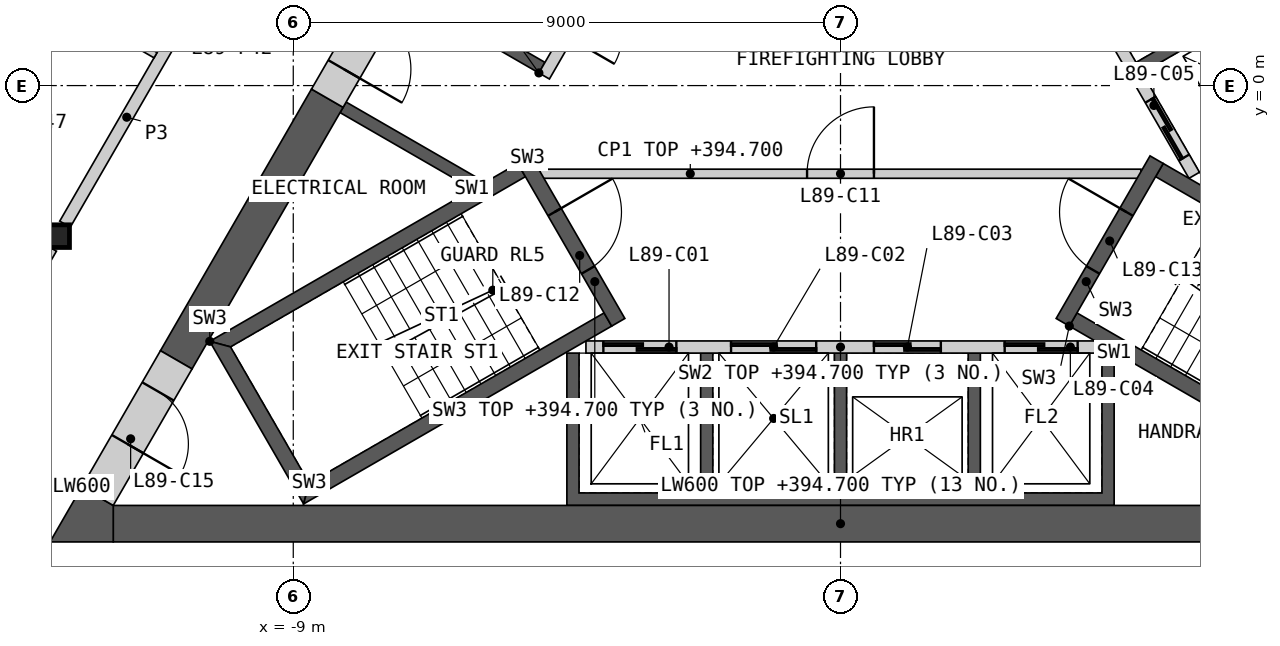
"""IFC4 building model, lengths in metres.
Left out: names, types, materials, properties, quantities, classifications, styles, units other than length and angle.
Written with IfcOpenShell. Run it as: python <this file> out.ifc"""

import sys

from ifc_helpers import new_model, si_unit, direction, frame, frame_2d, origin, origin_2d, place, context, subcontext, project, spatial, polyline, rectangle, i_section, outline, extrude, element, fill, save


model = new_model("IFC4")
c1 = context("Model", 3, precision=1e-05, world=origin(), true_north=direction((0.0, 1.0)))
c2 = subcontext(c1, "Body", "Model", "MODEL_VIEW")
j1 = project(units=[si_unit("LENGTHUNIT", "METRE"), si_unit("PLANEANGLEUNIT", "RADIAN")], contexts=[c1])
p1 = place(None, origin())
s1 = spatial("IfcSite", under=j1, at=p1, CompositionType="ELEMENT")
p2 = place(p1, origin())
s2 = spatial("IfcBuilding", under=s1, at=p2, CompositionType="ELEMENT")
p3 = place(p2, frame((0.0, 0.0, 391.6)))
s3 = spatial("IfcBuildingStorey", under=s2, at=p3, CompositionType="ELEMENT", Elevation=391.6)
p4 = place(p3, frame((-12.868, -2.476, 0.0), z_axis=(0.0, 0.0, 1.0), x_axis=(1.0, 0.0, 0.0)))
e1 = element("IfcColumn", 1, at=p4, inside=s3, PredefinedType="COLUMN", context=c2, shape_type="SweptSolid", body=[
    extrude(i_section(OverallWidth=0.374, OverallDepth=0.372, WebThickness=0.016, FlangeThickness=0.026, at=origin_2d()), origin(), (0.0, 0.0, 1.0), 3.4),
])
p5 = place(p3, origin())
e2 = element("IfcWall", 2, at=p5, inside=s3, PredefinedType="SHEAR", context=c2, shape_type="SweptSolid", body=[
    extrude(outline(polyline([(4.5, -4.4), (4.5, -6.906), (-4.5, -6.906), (-4.5, -4.4), (-4.3, -4.4), (-4.3, -6.7), (-2.3, -6.7), (-2.3, -4.4), (-2.1, -4.4), (-2.1, -6.7), (-0.1, -6.7), (-0.1, -4.4), (0.1, -4.4), (0.1, -6.7), (2.1, -6.7), (2.1, -4.4), (2.3, -4.4), (2.3, -6.7), (4.3, -6.7), (4.3, -4.4), (4.5, -4.4)])), origin(), (0.0, 0.0, 1.0), 3.1),
])
p6 = place(p3, frame((-4.187, -4.3, 0.0), z_axis=(0.0, 0.0, 1.0), x_axis=(1.0, 0.0, 0.0)))
e3 = element("IfcWall", 3, at=p6, inside=s3, PredefinedType="SOLIDWALL", context=c2, shape_type="SweptSolid", body=[
    extrude(rectangle(XDim=8.373, YDim=0.2, at=frame_2d((4.187, 0.0))), origin(), (0.0, 0.0, 1.0), 3.1),
])
p7 = place(p6, frame((0.287, 0.0, 0.0)))
e4 = element("IfcOpeningElement", 4, at=p7, cuts=e3, PredefinedType="OPENING", context=c2, shape_type="SweptSolid", body=[
    extrude(rectangle(XDim=1.2, YDim=2.1, at=frame_2d((0.6, 1.05))), frame((0.0, 0.11, 0.0), z_axis=(0.0, -1.0, 0.0), x_axis=(1.0, 0.0, 0.0)), (0.0, 0.0, 1.0), 0.22),
])
p8 = place(p6, frame((2.387, 0.0, 0.0)))
e5 = element("IfcOpeningElement", 5, at=p8, cuts=e3, PredefinedType="OPENING", context=c2, shape_type="SweptSolid", body=[
    extrude(rectangle(XDim=1.4, YDim=2.1, at=frame_2d((0.7, 1.05))), frame((0.0, 0.11, 0.0), z_axis=(0.0, -1.0, 0.0), x_axis=(1.0, 0.0, 0.0)), (0.0, 0.0, 1.0), 0.22),
])
p9 = place(p6, frame((4.737, 0.0, 0.0)))
e6 = element("IfcOpeningElement", 6, at=p9, cuts=e3, PredefinedType="OPENING", context=c2, shape_type="SweptSolid", body=[
    extrude(rectangle(XDim=1.1, YDim=2.1, at=frame_2d((0.55, 1.05))), frame((0.0, 0.11, 0.0), z_axis=(0.0, -1.0, 0.0), x_axis=(1.0, 0.0, 0.0)), (0.0, 0.0, 1.0), 0.22),
])
p10 = place(p6, frame((6.887, 0.0, 0.0)))
e7 = element("IfcOpeningElement", 7, at=p10, cuts=e3, PredefinedType="OPENING", context=c2, shape_type="SweptSolid", body=[
    extrude(rectangle(XDim=1.2, YDim=2.1, at=frame_2d((0.6, 1.05))), frame((0.0, 0.11, 0.0), z_axis=(0.0, -1.0, 0.0), x_axis=(1.0, 0.0, 0.0)), (0.0, 0.0, 1.0), 0.22),
])
p11 = place(p3, origin())
e8 = element("IfcWall", 8, at=p11, inside=s3, PredefinedType="SHEAR", context=c2, shape_type="SweptSolid", body=[
    extrude(outline(polyline([(1.561, 6.097), (3.731, 7.35), (8.231, -0.444), (6.061, -1.697), (5.96, -1.524), (7.952, -0.374), (6.952, 1.358), (4.96, 0.208), (4.861, 0.381), (6.852, 1.531), (5.852, 3.263), (3.861, 2.113), (3.76, 2.287), (5.752, 3.437), (4.752, 5.169), (2.76, 4.019), (2.66, 4.192), (4.652, 5.342), (3.652, 7.074), (1.66, 5.924), (1.561, 6.097)])), origin(), (0.0, 0.0, 1.0), 3.1),
])
p12 = place(p3, frame((5.817, -1.476, 0.0), z_axis=(0.0, 0.0, 1.0), x_axis=(-0.500002616675, 0.866023893041, 0.0)))
e9 = element("IfcWall", 9, at=p12, inside=s3, PredefinedType="SOLIDWALL", context=c2, shape_type="SweptSolid", body=[
    extrude(rectangle(XDim=8.373, YDim=0.2, at=frame_2d((4.187, 0.0))), origin(), (0.0, 0.0, 1.0), 3.1),
])
p13 = place(p12, frame((0.337, 0.0, 0.0)))
e10 = element("IfcOpeningElement", 10, at=p13, cuts=e9, PredefinedType="OPENING", context=c2, shape_type="SweptSolid", body=[
    extrude(rectangle(XDim=1.1, YDim=2.1, at=frame_2d((0.55, 1.05))), frame((0.0, 0.11, 0.0), z_axis=(0.0, -1.0, 0.0), x_axis=(1.0, 0.0, 0.0)), (0.0, 0.0, 1.0), 0.22),
])
p14 = place(p12, frame((2.537, 0.0, 0.0)))
e11 = element("IfcOpeningElement", 11, at=p14, cuts=e9, PredefinedType="OPENING", context=c2, shape_type="SweptSolid", body=[
    extrude(rectangle(XDim=1.1, YDim=2.1, at=frame_2d((0.55, 1.05))), frame((0.0, 0.11, 0.0), z_axis=(0.0, -1.0, 0.0), x_axis=(1.0, 0.0, 0.0)), (0.0, 0.0, 1.0), 0.22),
])
p15 = place(p12, frame((4.737, 0.0, 0.0)))
e12 = element("IfcOpeningElement", 12, at=p15, cuts=e9, PredefinedType="OPENING", context=c2, shape_type="SweptSolid", body=[
    extrude(rectangle(XDim=1.1, YDim=2.1, at=frame_2d((0.55, 1.05))), frame((0.0, 0.11, 0.0), z_axis=(0.0, -1.0, 0.0), x_axis=(1.0, 0.0, 0.0)), (0.0, 0.0, 1.0), 0.22),
])
p16 = place(p12, frame((7.037, 0.0, 0.0)))
e13 = element("IfcOpeningElement", 13, at=p16, cuts=e9, PredefinedType="OPENING", context=c2, shape_type="SweptSolid", body=[
    extrude(rectangle(XDim=0.9, YDim=2.1, at=frame_2d((0.45, 1.05))), frame((0.0, 0.11, 0.0), z_axis=(0.0, -1.0, 0.0), x_axis=(1.0, 0.0, 0.0)), (0.0, 0.0, 1.0), 0.22),
])
p17 = place(p3, origin())
e14 = element("IfcWall", 14, at=p17, inside=s3, PredefinedType="SHEAR", context=c2, shape_type="SweptSolid", body=[
    extrude(outline(polyline([(-6.061, -1.697), (-8.231, -0.444), (-8.131, -0.271), (-5.96, -1.524), (-6.061, -1.697)])), origin(), (0.0, 0.0, 1.0), 3.1),
])
p18 = place(p3, origin())
e15 = element("IfcWall", 15, at=p18, inside=s3, PredefinedType="SHEAR", context=c2, shape_type="SweptSolid", body=[
    extrude(outline(polyline([(-4.96, 0.208), (-7.131, 1.461), (-3.731, 7.35), (-1.561, 6.097), (-1.66, 5.924), (-3.652, 7.074), (-5.752, 3.437), (-3.76, 2.287), (-3.861, 2.113), (-5.852, 3.263), (-6.852, 1.531), (-4.861, 0.381), (-4.96, 0.208)])), origin(), (0.0, 0.0, 1.0), 3.1),
])
p19 = place(p3, frame((-1.631, 5.776, 0.0), z_axis=(0.0, 0.0, 1.0), x_axis=(-0.499992876559, -0.866029516466, 0.0)))
e16 = element("IfcWall", 16, at=p19, inside=s3, PredefinedType="SOLIDWALL", context=c2, shape_type="SweptSolid", body=[
    extrude(rectangle(XDim=6.486, YDim=0.2, at=frame_2d((3.243, 0.0))), origin(), (0.0, 0.0, 1.0), 3.1),
])
p20 = place(p19, frame((1.537, 0.0, 0.0)))
e17 = element("IfcOpeningElement", 17, at=p20, cuts=e16, PredefinedType="OPENING", context=c2, shape_type="SweptSolid", body=[
    extrude(rectangle(XDim=0.9, YDim=2.1, at=frame_2d((0.45, 1.05))), frame((0.0, 0.11, 0.0), z_axis=(0.0, -1.0, 0.0), x_axis=(1.0, 0.0, 0.0)), (0.0, 0.0, 1.0), 0.22),
])
p21 = place(p19, frame((4.837, 0.0, 0.0)))
e18 = element("IfcOpeningElement", 18, at=p21, cuts=e16, PredefinedType="OPENING", context=c2, shape_type="SweptSolid", body=[
    extrude(rectangle(XDim=0.9, YDim=2.1, at=frame_2d((0.45, 1.05))), frame((0.0, 0.11, 0.0), z_axis=(0.0, -1.0, 0.0), x_axis=(1.0, 0.0, 0.0)), (0.0, 0.0, 1.0), 0.22),
])
p22 = place(p3, frame((-4.941, -1.45, 0.0), z_axis=(0.0, 0.0, 1.0), x_axis=(1.0, 0.0, 0.0)))
e19 = element("IfcWall", 19, at=p22, inside=s3, PredefinedType="PARTITIONING", context=c2, shape_type="SweptSolid", body=[
    extrude(rectangle(XDim=9.882, YDim=0.15, at=frame_2d((4.941, 0.0))), origin(), (0.0, 0.0, 1.0), 3.1),
])
p23 = place(p22, frame((4.391, 0.0, 0.0)))
e20 = element("IfcOpeningElement", 20, at=p23, cuts=e19, PredefinedType="OPENING", context=c2, shape_type="SweptSolid", body=[
    extrude(rectangle(XDim=1.1, YDim=2.1, at=frame_2d((0.55, 1.05))), frame((0.0, 0.085, 0.0), z_axis=(0.0, -1.0, 0.0), x_axis=(1.0, 0.0, 0.0)), (0.0, 0.0, 1.0), 0.17),
])
p24 = place(p3, origin())
e21 = element("IfcWall", 21, at=p24, inside=s3, PredefinedType="SHEAR", context=c2, shape_type="SweptSolid", body=[
    extrude(outline(polyline([(-5.307, -1.281), (-10.374, -4.206), (-10.032, -4.298), (-5.182, -1.498), (-5.307, -1.281)])), origin(), (0.0, 0.0, 1.0), 3.1),
])
p25 = place(p3, origin())
e22 = element("IfcWall", 22, at=p25, inside=s3, PredefinedType="SHEAR", context=c2, shape_type="SweptSolid", body=[
    extrude(outline(polyline([(-10.374, -4.206), (-8.83, -6.881), (-8.738, -6.539), (-10.032, -4.298), (-10.374, -4.206)])), origin(), (0.0, 0.0, 1.0), 3.1),
])
p26 = place(p3, origin())
e23 = element("IfcWall", 23, at=p26, inside=s3, PredefinedType="SHEAR", context=c2, shape_type="SweptSolid", body=[
    extrude(outline(polyline([(-8.738, -6.539), (-8.83, -6.881), (-3.763, -3.956), (-3.888, -3.739), (-8.738, -6.539)])), origin(), (0.0, 0.0, 1.0), 3.1),
])
p27 = place(p3, frame((-5.199, -1.219, 0.0), z_axis=(0.0, 0.0, 1.0), x_axis=(0.499982516597, -0.866035497597, 0.0)))
e24 = element("IfcWall", 24, at=p27, inside=s3, PredefinedType="SHEAR", context=c2, shape_type="SweptSolid", body=[
    extrude(rectangle(XDim=3.088, YDim=0.25, at=frame_2d((1.544, 0.0))), origin(), (0.0, 0.0, 1.0), 3.1),
])
p28 = place(p27, frame((0.994, 0.0, 0.0)))
e25 = element("IfcOpeningElement", 25, at=p28, cuts=e24, PredefinedType="OPENING", context=c2, shape_type="SweptSolid", body=[
    extrude(rectangle(XDim=1.1, YDim=2.1, at=frame_2d((0.55, 1.05))), frame((0.0, 0.135, 0.0), z_axis=(0.0, -1.0, 0.0), x_axis=(1.0, 0.0, 0.0)), (0.0, 0.0, 1.0), 0.27),
])
p29 = place(p3, origin())
e26 = element("IfcWall", 26, at=p29, inside=s3, PredefinedType="SHEAR", context=c2, shape_type="SweptSolid", body=[
    extrude(outline(polyline([(3.763, -3.956), (8.83, -6.881), (8.738, -6.539), (3.888, -3.739), (3.763, -3.956)])), origin(), (0.0, 0.0, 1.0), 3.1),
])
p30 = place(p3, origin())
e27 = element("IfcWall", 27, at=p30, inside=s3, PredefinedType="SHEAR", context=c2, shape_type="SweptSolid", body=[
    extrude(outline(polyline([(10.032, -4.298), (10.374, -4.206), (5.307, -1.281), (5.182, -1.498), (10.032, -4.298)])), origin(), (0.0, 0.0, 1.0), 3.1),
])
p31 = place(p3, frame((3.655, -3.893, 0.0), z_axis=(0.0, 0.0, 1.0), x_axis=(0.499982516597, 0.866035497597, 0.0)))
e28 = element("IfcWall", 28, at=p31, inside=s3, PredefinedType="SHEAR", context=c2, shape_type="SweptSolid", body=[
    extrude(rectangle(XDim=3.088, YDim=0.25, at=frame_2d((1.544, 0.0))), origin(), (0.0, 0.0, 1.0), 3.1),
])
p32 = place(p31, frame((0.994, 0.0, 0.0)))
e29 = element("IfcOpeningElement", 29, at=p32, cuts=e28, PredefinedType="OPENING", context=c2, shape_type="SweptSolid", body=[
    extrude(rectangle(XDim=1.1, YDim=2.1, at=frame_2d((0.55, 1.05))), frame((0.0, 0.135, 0.0), z_axis=(0.0, -1.0, 0.0), x_axis=(1.0, 0.0, 0.0)), (0.0, 0.0, 1.0), 0.27),
])
p33 = place(p3, frame((-11.961, -7.206, 0.0), z_axis=(0.0, 0.0, 1.0), x_axis=(1.0, 0.0, 0.0)))
e30 = element("IfcWall", 30, at=p33, inside=s3, PredefinedType="SHEAR", context=c2, shape_type="SweptSolid", body=[
    extrude(rectangle(XDim=23.921, YDim=0.6, at=frame_2d((11.961, 0.0))), origin(), (0.0, 0.0, 1.0), 3.1),
])
p34 = place(p3, frame((8.686, -0.634, 0.0), z_axis=(0.0, 0.0, 1.0), x_axis=(-0.50001836461, 0.866014800712, 0.0)))
e31 = element("IfcWall", 31, at=p34, inside=s3, PredefinedType="SHEAR", context=c2, shape_type="SweptSolid", body=[
    extrude(rectangle(XDim=10.451, YDim=0.6, at=frame_2d((5.225, 0.0))), origin(), (0.0, 0.0, 1.0), 3.1),
])
p35 = place(p3, frame((-8.44, -0.208, 0.0), z_axis=(0.0, 0.0, 1.0), x_axis=(-0.500007425856, -0.866021116422, 0.0)))
e32 = element("IfcWall", 32, at=p35, inside=s3, PredefinedType="SHEAR", context=c2, shape_type="SweptSolid", body=[
    extrude(rectangle(XDim=4.969, YDim=0.6, at=frame_2d((2.484, 0.0))), origin(), (0.0, 0.0, 1.0), 3.1),
])
p36 = place(p3, origin())
e33 = element("IfcWall", 33, at=p36, inside=s3, PredefinedType="SHEAR", context=c2, shape_type="SweptSolid", body=[
    extrude(outline(polyline([(-12.48, -6.606), (-11.961, -6.906), (-11.961, -7.506), (-13.0, -7.506), (-12.48, -6.606)])), origin(), (0.0, 0.0, 1.0), 3.1),
])
p37 = place(p3, frame((-10.925, -4.511, 0.0), z_axis=(0.0, 0.0, 1.0), x_axis=(-0.500018667571, -0.866014625789, 0.0)))
e34 = element("IfcWall", 34, at=p37, inside=s3, PredefinedType="SHEAR", context=c2, shape_type="SweptSolid", body=[
    extrude(rectangle(XDim=2.592, YDim=0.6, at=frame_2d((1.296, 0.0))), origin(), (0.0, 0.0, 1.0), 3.1),
])
p38 = place(p37, frame((0.6, 0.0, 0.0)))
e35 = element("IfcOpeningElement", 35, at=p38, cuts=e34, PredefinedType="OPENING", context=c2, shape_type="SweptSolid", body=[
    extrude(rectangle(XDim=1.0, YDim=2.1, at=frame_2d((0.5, 1.05))), frame((0.0, 0.31, 0.0), z_axis=(0.0, -1.0, 0.0), x_axis=(1.0, 0.0, 0.0)), (0.0, 0.0, 1.0), 0.62),
])
p39 = place(p3, frame((-7.34, 1.698, 0.0), z_axis=(0.0, 0.0, 1.0), x_axis=(-0.50002983664, -0.866008176907, 0.0)))
e36 = element("IfcWall", 36, at=p39, inside=s3, PredefinedType="SHEAR", context=c2, shape_type="SweptSolid", body=[
    extrude(rectangle(XDim=2.2, YDim=0.6, at=frame_2d((1.1, 0.0))), origin(), (0.0, 0.0, 1.0), 3.1),
])
p40 = place(p39, frame((0.55, 0.0, 0.0)))
e37 = element("IfcOpeningElement", 37, at=p40, cuts=e36, PredefinedType="OPENING", context=c2, shape_type="SweptSolid", body=[
    extrude(rectangle(XDim=1.1, YDim=2.1, at=frame_2d((0.55, 1.05))), frame((0.0, 0.31, 0.0), z_axis=(0.0, -1.0, 0.0), x_axis=(1.0, 0.0, 0.0)), (0.0, 0.0, 1.0), 0.62),
])
p41 = place(p3, frame((-12.754, -2.279, 0.0), z_axis=(0.0, 0.0, 1.0), x_axis=(0.500001682468, 0.866024432409, 0.0)))
e38 = element("IfcWall", 38, at=p41, inside=s3, PredefinedType="PARTITIONING", context=c2, shape_type="SweptSolid", body=[
    extrude(rectangle(XDim=8.124, YDim=0.2, at=frame_2d((4.062, 0.0))), origin(), (0.0, 0.0, 1.0), 3.1),
])
p42 = place(p41, frame((3.762, 0.0, 0.0)))
e39 = element("IfcOpeningElement", 39, at=p42, cuts=e38, PredefinedType="OPENING", context=c2, shape_type="SweptSolid", body=[
    extrude(rectangle(XDim=1.0, YDim=2.1, at=frame_2d((0.5, 1.05))), frame((0.0, 0.11, 0.0), z_axis=(0.0, -1.0, 0.0), x_axis=(1.0, 0.0, 0.0)), (0.0, 0.0, 1.0), 0.22),
])
p43 = place(p3, frame((-15.244, -6.592, 0.0), z_axis=(0.0, 0.0, 1.0), x_axis=(0.499974648164, 0.866040040179, 0.0)))
e40 = element("IfcWall", 40, at=p43, inside=s3, PredefinedType="PARTITIONING", context=c2, shape_type="SweptSolid", body=[
    extrude(rectangle(XDim=4.525, YDim=0.2, at=frame_2d((2.263, 0.0))), origin(), (0.0, 0.0, 1.0), 3.1),
])
p44 = place(p3, frame((-17.414, 4.049, 0.0), z_axis=(0.0, 0.0, 1.0), x_axis=(0.866033839264, -0.499985389037, 0.0)))
e41 = element("IfcWall", 41, at=p44, inside=s3, PredefinedType="PARTITIONING", context=c2, shape_type="SweptSolid", body=[
    extrude(rectangle(XDim=7.1, YDim=0.1, at=frame_2d((3.55, 0.0))), origin(), (0.0, 0.0, 1.0), 2.33),
])
p45 = place(p44, frame((1.158, 0.0, 0.0)))
e42 = element("IfcOpeningElement", 42, at=p45, cuts=e41, PredefinedType="OPENING", context=c2, shape_type="SweptSolid", body=[
    extrude(rectangle(XDim=0.95, YDim=2.1, at=frame_2d((0.475, 1.05))), frame((0.0, 0.06, 0.0), z_axis=(0.0, -1.0, 0.0), x_axis=(1.0, 0.0, 0.0)), (0.0, 0.0, 1.0), 0.12),
])
p46 = place(p7, origin())
e43 = element("IfcDoor", 43, at=p46, inside=s3, OperationType="SLIDING_TO_LEFT", PredefinedType="DOOR", context=c2, shape_type="SweptSolid", body=[
    extrude(rectangle(XDim=1.2, YDim=2.1, at=frame_2d((0.6, 1.05))), frame((0.0, 0.025, 0.0), z_axis=(0.0, -1.0, 0.0), x_axis=(1.0, 0.0, 0.0)), (0.0, 0.0, 1.0), 0.05),
])
fill(e4, e43)
p47 = place(p8, origin())
e44 = element("IfcDoor", 44, at=p47, inside=s3, OperationType="SLIDING_TO_LEFT", PredefinedType="DOOR", context=c2, shape_type="SweptSolid", body=[
    extrude(rectangle(XDim=1.4, YDim=2.1, at=frame_2d((0.7, 1.05))), frame((0.0, 0.025, 0.0), z_axis=(0.0, -1.0, 0.0), x_axis=(1.0, 0.0, 0.0)), (0.0, 0.0, 1.0), 0.05),
])
fill(e5, e44)
p48 = place(p9, origin())
e45 = element("IfcDoor", 45, at=p48, inside=s3, OperationType="SLIDING_TO_LEFT", PredefinedType="DOOR", context=c2, shape_type="SweptSolid", body=[
    extrude(rectangle(XDim=1.1, YDim=2.1, at=frame_2d((0.55, 1.05))), frame((0.0, 0.025, 0.0), z_axis=(0.0, -1.0, 0.0), x_axis=(1.0, 0.0, 0.0)), (0.0, 0.0, 1.0), 0.05),
])
fill(e6, e45)
p49 = place(p10, origin())
e46 = element("IfcDoor", 46, at=p49, inside=s3, OperationType="SLIDING_TO_LEFT", PredefinedType="DOOR", context=c2, shape_type="SweptSolid", body=[
    extrude(rectangle(XDim=1.2, YDim=2.1, at=frame_2d((0.6, 1.05))), frame((0.0, 0.025, 0.0), z_axis=(0.0, -1.0, 0.0), x_axis=(1.0, 0.0, 0.0)), (0.0, 0.0, 1.0), 0.05),
])
fill(e7, e46)
p50 = place(p13, origin())
e47 = element("IfcDoor", 47, at=p50, inside=s3, OperationType="SLIDING_TO_LEFT", PredefinedType="DOOR", context=c2, shape_type="SweptSolid", body=[
    extrude(rectangle(XDim=1.1, YDim=2.1, at=frame_2d((0.55, 1.05))), frame((0.0, 0.025, 0.0), z_axis=(0.0, -1.0, 0.0), x_axis=(1.0, 0.0, 0.0)), (0.0, 0.0, 1.0), 0.05),
])
fill(e10, e47)
p51 = place(p23, origin())
e48 = element("IfcDoor", 48, at=p51, inside=s3, OperationType="SINGLE_SWING_RIGHT", PredefinedType="DOOR", context=c2, shape_type="SweptSolid", body=[
    extrude(rectangle(XDim=1.1, YDim=2.1, at=frame_2d((0.55, 1.05))), frame((0.0, 0.025, 0.0), z_axis=(0.0, -1.0, 0.0), x_axis=(1.0, 0.0, 0.0)), (0.0, 0.0, 1.0), 0.05),
])
fill(e20, e48)
p52 = place(p28, origin())
e49 = element("IfcDoor", 49, at=p52, inside=s3, OperationType="SINGLE_SWING_LEFT", PredefinedType="DOOR", context=c2, shape_type="SweptSolid", body=[
    extrude(rectangle(XDim=1.1, YDim=2.1, at=frame_2d((0.55, 1.05))), frame((0.0, 0.025, 0.0), z_axis=(0.0, -1.0, 0.0), x_axis=(1.0, 0.0, 0.0)), (0.0, 0.0, 1.0), 0.05),
])
fill(e25, e49)
p53 = place(p32, origin())
e50 = element("IfcDoor", 50, at=p53, inside=s3, OperationType="SINGLE_SWING_RIGHT", PredefinedType="DOOR", context=c2, shape_type="SweptSolid", body=[
    extrude(rectangle(XDim=1.1, YDim=2.1, at=frame_2d((0.55, 1.05))), frame((0.0, 0.025, 0.0), z_axis=(0.0, -1.0, 0.0), x_axis=(1.0, 0.0, 0.0)), (0.0, 0.0, 1.0), 0.05),
])
fill(e29, e50)
p54 = place(p38, origin())
e51 = element("IfcDoor", 51, at=p54, inside=s3, OperationType="SINGLE_SWING_RIGHT", PredefinedType="DOOR", context=c2, shape_type="SweptSolid", body=[
    extrude(rectangle(XDim=1.0, YDim=2.1, at=frame_2d((0.5, 1.05))), frame((0.0, 0.055, 0.0), z_axis=(0.0, -1.0, 0.0), x_axis=(1.0, 0.0, 0.0)), (0.0, 0.0, 1.0), 0.05),
])
fill(e35, e51)
p55 = place(p40, origin())
e52 = element("IfcDoor", 52, at=p55, inside=s3, OperationType="SINGLE_SWING_RIGHT", PredefinedType="DOOR", context=c2, shape_type="SweptSolid", body=[
    extrude(rectangle(XDim=1.1, YDim=2.1, at=frame_2d((0.55, 1.05))), frame((0.0, 0.055, 0.0), z_axis=(0.0, -1.0, 0.0), x_axis=(1.0, 0.0, 0.0)), (0.0, 0.0, 1.0), 0.05),
])
fill(e37, e52)
save(model, sys.argv[1])
